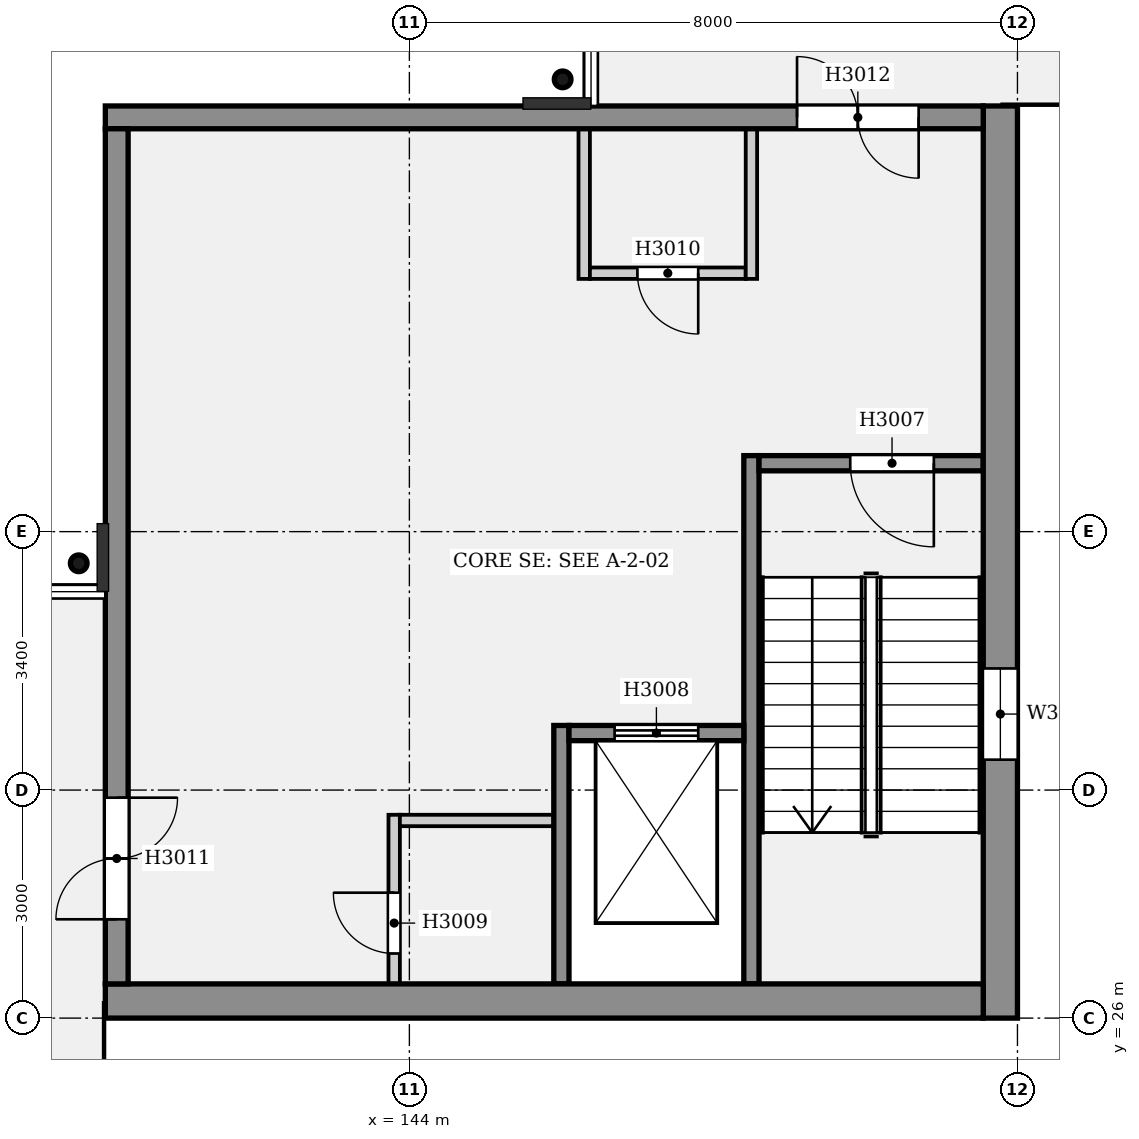
"""IFC4 building model, lengths in metres.
Left out: names, types, materials, properties, quantities, classifications, styles, units other than length and angle.
Written with IfcOpenShell. Run it as: python <this file> out.ifc"""

import sys

from ifc_helpers import new_model, si_unit, direction, frame, frame_2d, origin, origin_2d, place, context, subcontext, project, spatial, rectangle, hollow_circle, extrude, element, fill, save


model = new_model("IFC4")
c1 = context("Model", 3, precision=1e-05, world=origin(), true_north=direction((0.0, 1.0)))
c2 = subcontext(c1, "Body", "Model", "MODEL_VIEW")
j1 = project(units=[si_unit("LENGTHUNIT", "METRE"), si_unit("PLANEANGLEUNIT", "RADIAN")], contexts=[c1])
p1 = place(None, origin())
s1 = spatial("IfcSite", under=j1, at=p1, CompositionType="ELEMENT")
p2 = place(p1, origin())
s2 = spatial("IfcBuilding", under=s1, at=p2, CompositionType="ELEMENT")
p3 = place(p2, frame((0.0, 0.0, 13.8)))
s3 = spatial("IfcBuildingStorey", under=s2, at=p3, CompositionType="ELEMENT", Elevation=13.8)
p4 = place(p3, frame((151.775, 26.0, 0.0), z_axis=(0.0, 0.0, 1.0), x_axis=(0.0, 1.0, 0.0)))
e1 = element("IfcWall", 1, at=p4, inside=s3, PredefinedType="ELEMENTEDWALL", context=c2, shape_type="SweptSolid", body=[
    extrude(rectangle(XDim=12.0, YDim=0.45, at=frame_2d((6.0, 0.0))), origin(), (0.0, 0.0, 1.0), 4.4),
])
p5 = place(p4, frame((3.4, 0.0, 0.6)))
e2 = element("IfcOpeningElement", 2, at=p5, cuts=e1, PredefinedType="OPENING", context=c2, shape_type="SweptSolid", body=[
    extrude(rectangle(XDim=1.2, YDim=3.0, at=frame_2d((0.6, 1.5))), frame((0.0, 0.235, 0.0), z_axis=(0.0, -1.0, 0.0), x_axis=(1.0, 0.0, 0.0)), (0.0, 0.0, 1.0), 0.47),
])
p6 = place(p3, frame((151.55, 26.225, 0.0), z_axis=(0.0, 0.0, 1.0), x_axis=(-1.0, 0.0, 0.0)))
e3 = element("IfcWall", 3, at=p6, inside=s3, PredefinedType="ELEMENTEDWALL", context=c2, shape_type="SweptSolid", body=[
    extrude(rectangle(XDim=11.55, YDim=0.45, at=frame_2d((5.775, 0.0))), origin(), (0.0, 0.0, 1.0), 4.4),
])
p7 = place(p3, frame((140.15, 26.45, 0.0), z_axis=(0.0, 0.0, 1.0), x_axis=(0.0, 1.0, 0.0)))
e4 = element("IfcWall", 4, at=p7, inside=s3, PredefinedType="SOLIDWALL", context=c2, shape_type="SweptSolid", body=[
    extrude(rectangle(XDim=11.25, YDim=0.3, at=frame_2d((5.625, 0.0))), origin(), (0.0, 0.0, 1.0), 4.4),
])
p8 = place(p7, frame((0.85, 0.0, 0.0)))
e5 = element("IfcOpeningElement", 5, at=p8, cuts=e4, PredefinedType="OPENING", context=c2, shape_type="SweptSolid", body=[
    extrude(rectangle(XDim=1.6, YDim=2.1, at=frame_2d((0.8, 1.05))), frame((0.0, 0.16, 0.0), z_axis=(0.0, -1.0, 0.0), x_axis=(1.0, 0.0, 0.0)), (0.0, 0.0, 1.0), 0.32),
])
p9 = place(p3, frame((151.55, 37.85, 0.0), z_axis=(0.0, 0.0, 1.0), x_axis=(-1.0, 0.0, 0.0)))
e6 = element("IfcWall", 6, at=p9, inside=s3, PredefinedType="SOLIDWALL", context=c2, shape_type="SweptSolid", body=[
    extrude(rectangle(XDim=11.55, YDim=0.3, at=frame_2d((5.775, 0.0))), origin(), (0.0, 0.0, 1.0), 4.4),
])
p10 = place(p9, frame((0.85, 0.0, 0.0)))
e7 = element("IfcOpeningElement", 7, at=p10, cuts=e6, PredefinedType="OPENING", context=c2, shape_type="SweptSolid", body=[
    extrude(rectangle(XDim=1.6, YDim=2.1, at=frame_2d((0.8, 1.05))), frame((0.0, 0.16, 0.0), z_axis=(0.0, -1.0, 0.0), x_axis=(1.0, 0.0, 0.0)), (0.0, 0.0, 1.0), 0.32),
])
for number, where, z_axis, x_axis in (
    (8, (139.65, 31.984, -0.128), (0.0, 0.199, 0.98), (-1.0, 0.0, 0.0)),
    (9, (146.016, 38.35, -0.128), (-0.199, 0.0, 0.98), (0.0, -1.0, 0.0)),
):
    element("IfcColumn", number, at=place(p3, frame(where, z_axis=z_axis, x_axis=x_axis)), inside=s3, PredefinedType="COLUMN", context=c2, shape_type="SweptSolid", body=[
        extrude(hollow_circle(Radius=0.11, WallThickness=0.013, at=origin_2d()), origin(), (0.0, 0.0, 1.0), 4.621),
    ])
p11 = place(p3, frame((148.5, 26.45, 0.0), z_axis=(0.0, 0.0, 1.0), x_axis=(0.0, 1.0, 0.0)))
e10 = element("IfcWall", 10, at=p11, inside=s3, PredefinedType="SOLIDWALL", context=c2, shape_type="SweptSolid", body=[
    extrude(rectangle(XDim=6.95, YDim=0.2, at=frame_2d((3.475, 0.0))), origin(), (0.0, 0.0, 1.0), 4.4),
])
p12 = place(p3, frame((151.55, 33.3, 0.0), z_axis=(0.0, 0.0, 1.0), x_axis=(-1.0, 0.0, 0.0)))
e11 = element("IfcWall", 11, at=p12, inside=s3, PredefinedType="SOLIDWALL", context=c2, shape_type="SweptSolid", body=[
    extrude(rectangle(XDim=2.95, YDim=0.2, at=frame_2d((1.475, 0.0))), origin(), (0.0, 0.0, 1.0), 4.4),
])
p13 = place(p12, frame((0.65, 0.0, 0.0)))
e12 = element("IfcOpeningElement", 12, at=p13, cuts=e11, PredefinedType="OPENING", context=c2, shape_type="SweptSolid", body=[
    extrude(rectangle(XDim=1.1, YDim=2.1, at=frame_2d((0.55, 1.05))), frame((0.0, 0.11, 0.0), z_axis=(0.0, -1.0, 0.0), x_axis=(1.0, 0.0, 0.0)), (0.0, 0.0, 1.0), 0.22),
])
p14 = place(p3, frame((146.0, 26.45, 0.0), z_axis=(0.0, 0.0, 1.0), x_axis=(0.0, 1.0, 0.0)))
e13 = element("IfcWall", 13, at=p14, inside=s3, PredefinedType="SOLIDWALL", context=c2, shape_type="SweptSolid", body=[
    extrude(rectangle(XDim=3.4, YDim=0.2, at=frame_2d((1.7, 0.0))), origin(), (0.0, 0.0, 1.0), 4.4),
])
p15 = place(p3, frame((148.4, 29.75, 0.0), z_axis=(0.0, 0.0, 1.0), x_axis=(-1.0, 0.0, 0.0)))
e14 = element("IfcWall", 14, at=p15, inside=s3, PredefinedType="SOLIDWALL", context=c2, shape_type="SweptSolid", body=[
    extrude(rectangle(XDim=2.3, YDim=0.2, at=frame_2d((1.15, 0.0))), origin(), (0.0, 0.0, 1.0), 4.4),
])
p16 = place(p15, frame((0.6, 0.0, 0.0)))
e15 = element("IfcOpeningElement", 15, at=p16, cuts=e14, PredefinedType="OPENING", context=c2, shape_type="SweptSolid", body=[
    extrude(rectangle(XDim=1.1, YDim=2.1, at=frame_2d((0.55, 1.05))), frame((0.0, 0.11, 0.0), z_axis=(0.0, -1.0, 0.0), x_axis=(1.0, 0.0, 0.0)), (0.0, 0.0, 1.0), 0.22),
])
p17 = place(p3, frame((145.9, 28.6, 0.0), z_axis=(0.0, 0.0, 1.0), x_axis=(-1.0, 0.0, 0.0)))
e16 = element("IfcWall", 16, at=p17, inside=s3, PredefinedType="PARTITIONING", context=c2, shape_type="SweptSolid", body=[
    extrude(rectangle(XDim=2.025, YDim=0.15, at=frame_2d((1.012, 0.0))), origin(), (0.0, 0.0, 1.0), 4.15),
])
p18 = place(p3, frame((143.8, 26.45, 0.0), z_axis=(0.0, 0.0, 1.0), x_axis=(0.0, 1.0, 0.0)))
e17 = element("IfcWall", 17, at=p18, inside=s3, PredefinedType="PARTITIONING", context=c2, shape_type="SweptSolid", body=[
    extrude(rectangle(XDim=2.225, YDim=0.15, at=frame_2d((1.113, 0.0))), origin(), (0.0, 0.0, 1.0), 4.15),
])
p19 = place(p18, frame((0.4, 0.0, 0.0)))
e18 = element("IfcOpeningElement", 18, at=p19, cuts=e17, PredefinedType="OPENING", context=c2, shape_type="SweptSolid", body=[
    extrude(rectangle(XDim=0.8, YDim=2.1, at=frame_2d((0.4, 1.05))), frame((0.0, 0.085, 0.0), z_axis=(0.0, -1.0, 0.0), x_axis=(1.0, 0.0, 0.0)), (0.0, 0.0, 1.0), 0.17),
])
p20 = place(p3, frame((148.425, 35.8, 0.0), z_axis=(0.0, 0.0, 1.0), x_axis=(-1.0, 0.0, 0.0)))
e19 = element("IfcWall", 19, at=p20, inside=s3, PredefinedType="PARTITIONING", context=c2, shape_type="SweptSolid", body=[
    extrude(rectangle(XDim=2.05, YDim=0.15, at=frame_2d((1.025, 0.0))), origin(), (0.0, 0.0, 1.0), 4.15),
])
p21 = place(p20, frame((0.625, 0.0, 0.0)))
e20 = element("IfcOpeningElement", 20, at=p21, cuts=e19, PredefinedType="OPENING", context=c2, shape_type="SweptSolid", body=[
    extrude(rectangle(XDim=0.8, YDim=2.1, at=frame_2d((0.4, 1.05))), frame((0.0, 0.085, 0.0), z_axis=(0.0, -1.0, 0.0), x_axis=(1.0, 0.0, 0.0)), (0.0, 0.0, 1.0), 0.17),
])
for number, where, z_axis, x_axis in (
    (21, (148.5, 35.725, 0.0), (0.0, 0.0, 1.0), (0.0, 1.0, 0.0)),
    (22, (146.3, 35.725, 0.0), (0.0, 0.0, 1.0), (0.0, 1.0, 0.0)),
):
    element("IfcWall", number, at=place(p3, frame(where, z_axis=z_axis, x_axis=x_axis)), inside=s3, PredefinedType="PARTITIONING", context=c2, shape_type="SweptSolid", body=[
        extrude(rectangle(XDim=1.975, YDim=0.15, at=frame_2d((0.987, 0.0))), origin(), (0.0, 0.0, 1.0), 4.15),
    ])
p22 = place(p13, origin())
e23 = element("IfcDoor", 23, at=p22, inside=s3, OperationType="SINGLE_SWING_LEFT", PredefinedType="DOOR", context=c2, shape_type="SweptSolid", body=[
    extrude(rectangle(XDim=1.1, YDim=2.1, at=frame_2d((0.55, 1.05))), frame((0.0, 0.025, 0.0), z_axis=(0.0, -1.0, 0.0), x_axis=(1.0, 0.0, 0.0)), (0.0, 0.0, 1.0), 0.05),
])
fill(e12, e23)
p23 = place(p16, origin())
e24 = element("IfcDoor", 24, at=p23, inside=s3, OperationType="DOUBLE_DOOR_SLIDING", PredefinedType="DOOR", context=c2, shape_type="SweptSolid", body=[
    extrude(rectangle(XDim=1.1, YDim=2.1, at=frame_2d((0.55, 1.05))), frame((0.0, 0.025, 0.0), z_axis=(0.0, -1.0, 0.0), x_axis=(1.0, 0.0, 0.0)), (0.0, 0.0, 1.0), 0.05),
])
fill(e15, e24)
p24 = place(p19, origin())
e25 = element("IfcDoor", 25, at=p24, inside=s3, OperationType="SINGLE_SWING_RIGHT", PredefinedType="DOOR", context=c2, shape_type="SweptSolid", body=[
    extrude(rectangle(XDim=0.8, YDim=2.1, at=frame_2d((0.4, 1.05))), frame((0.0, 0.025, 0.0), z_axis=(0.0, -1.0, 0.0), x_axis=(1.0, 0.0, 0.0)), (0.0, 0.0, 1.0), 0.05),
])
fill(e18, e25)
p25 = place(p21, origin())
e26 = element("IfcDoor", 26, at=p25, inside=s3, OperationType="SINGLE_SWING_LEFT", PredefinedType="DOOR", context=c2, shape_type="SweptSolid", body=[
    extrude(rectangle(XDim=0.8, YDim=2.1, at=frame_2d((0.4, 1.05))), frame((0.0, 0.025, 0.0), z_axis=(0.0, -1.0, 0.0), x_axis=(1.0, 0.0, 0.0)), (0.0, 0.0, 1.0), 0.05),
])
fill(e20, e26)
p26 = place(p8, origin())
e27 = element("IfcDoor", 27, at=p26, inside=s3, OperationType="DOUBLE_DOOR_SINGLE_SWING", PredefinedType="DOOR", context=c2, shape_type="SweptSolid", body=[
    extrude(rectangle(XDim=1.6, YDim=2.1, at=frame_2d((0.8, 1.05))), frame((0.0, 0.025, 0.0), z_axis=(0.0, -1.0, 0.0), x_axis=(1.0, 0.0, 0.0)), (0.0, 0.0, 1.0), 0.05),
])
fill(e5, e27)
p27 = place(p10, origin())
e28 = element("IfcDoor", 28, at=p27, inside=s3, OperationType="DOUBLE_DOOR_SINGLE_SWING", PredefinedType="DOOR", context=c2, shape_type="SweptSolid", body=[
    extrude(rectangle(XDim=1.6, YDim=2.1, at=frame_2d((0.8, 1.05))), frame((0.0, 0.025, 0.0), z_axis=(0.0, -1.0, 0.0), x_axis=(1.0, 0.0, 0.0)), (0.0, 0.0, 1.0), 0.05),
])
fill(e7, e28)
p28 = place(p5, origin())
e29 = element("IfcWindow", 29, at=p28, inside=s3, PartitioningType="SINGLE_PANEL", PredefinedType="WINDOW", context=c2, shape_type="SweptSolid", body=[
    extrude(rectangle(XDim=1.2, YDim=3.0, at=frame_2d((0.6, 1.5))), frame((0.0, 0.03, 0.0), z_axis=(0.0, -1.0, 0.0), x_axis=(1.0, 0.0, 0.0)), (0.0, 0.0, 1.0), 0.06),
])
fill(e2, e29)
save(model, sys.argv[1])
